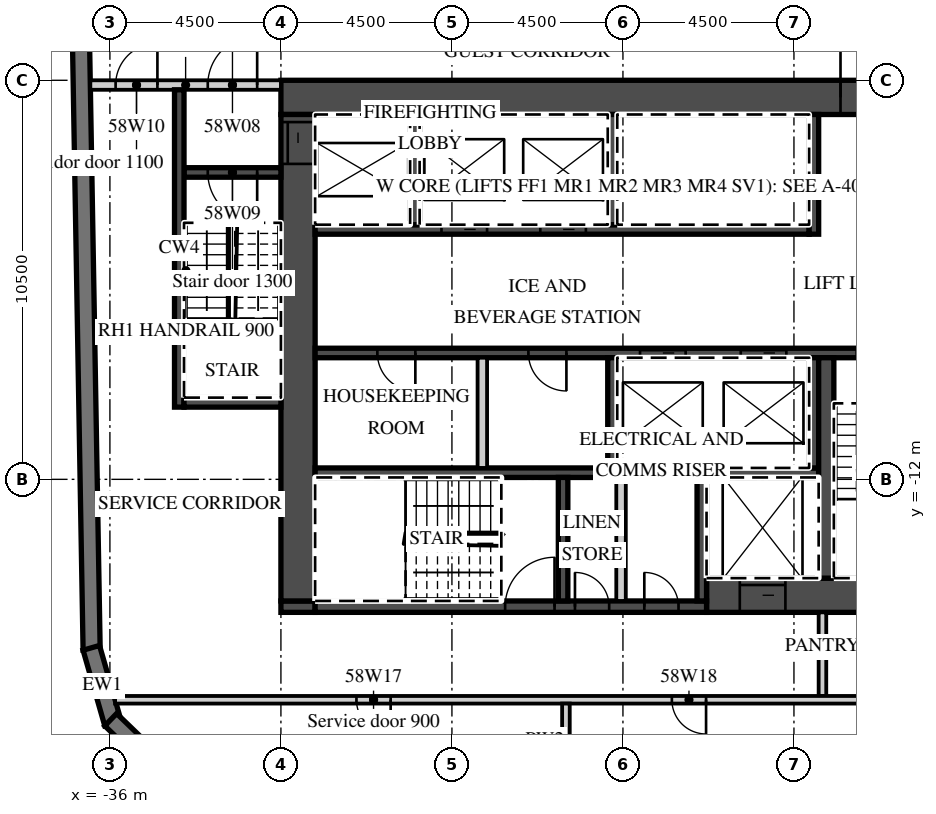
"""IFC4 building model, lengths in metres.
Left out: names, types, materials, properties, quantities, classifications, styles, units other than length and angle.
Written with IfcOpenShell. Run it as: python <this file> out.ifc"""

import sys

from ifc_helpers import new_model, si_unit, direction, frame, frame_2d, origin, place, context, subcontext, project, spatial, polyline, rectangle, outline, extrude, element, fill, save


model = new_model("IFC4")
c1 = context("Model", 3, precision=1e-05, world=origin(), true_north=direction((0.0, 1.0)))
c2 = subcontext(c1, "Body", "Model", "MODEL_VIEW")
j1 = project(units=[si_unit("LENGTHUNIT", "METRE"), si_unit("PLANEANGLEUNIT", "RADIAN")], contexts=[c1])
p1 = place(None, origin())
s1 = spatial("IfcSite", under=j1, at=p1, CompositionType="ELEMENT")
p2 = place(p1, origin())
s2 = spatial("IfcBuilding", under=s1, at=p2, CompositionType="ELEMENT")
p3 = place(p2, frame((0.0, 0.0, 237.5)))
s3 = spatial("IfcBuildingStorey", under=s2, at=p3, CompositionType="ELEMENT", Elevation=237.5)
p4 = place(p3, frame((-37.057, 16.503, 0.0), z_axis=(0.0, 0.0, 1.0), x_axis=(0.017452279857, -0.999847697366, 0.0)))
e1 = element("IfcWall", 1, at=p4, inside=s3, PredefinedType="SOLIDWALL", context=c2, shape_type="SweptSolid", body=[
    extrude(rectangle(XDim=33.0, YDim=0.45, at=frame_2d((16.5, 0.0))), origin(), (0.0, 0.0, 1.0), 3.02),
])
p5 = place(p3, frame((-36.49, -16.434, 0.0), z_axis=(0.0, 0.0, 1.0), x_axis=(0.275577603096, -0.961278827745, 0.0)))
e2 = element("IfcWall", 2, at=p5, inside=s3, PredefinedType="SOLIDWALL", context=c2, shape_type="SweptSolid", body=[
    extrude(outline(polyline([(0.0, -0.225), (2.071, -0.225), (1.95, 0.225), (0.121, 0.225), (0.0, -0.225)])), origin(), (0.0, 0.0, 1.0), 3.02),
])
p6 = place(p3, frame((-35.979, -18.324, 0.0), z_axis=(0.0, 0.0, 1.0), x_axis=(0.719320193998, -0.694678672846, 0.0)))
e3 = element("IfcWall", 3, at=p6, inside=s3, PredefinedType="SOLIDWALL", context=c2, shape_type="SweptSolid", body=[
    extrude(outline(polyline([(0.0, -0.225), (2.071, -0.225), (1.95, 0.225), (0.121, 0.225), (0.0, -0.225)])), origin(), (0.0, 0.0, 1.0), 3.02),
])
p7 = place(p3, frame((-31.5, -1.95, 0.0), z_axis=(0.0, 0.0, 1.0), x_axis=(1.0, 0.0, 0.0)))
e4 = element("IfcWall", 4, at=p7, inside=s3, PredefinedType="SHEAR", context=c2, shape_type="SweptSolid", body=[
    extrude(rectangle(XDim=18.0, YDim=0.9, at=frame_2d((9.0, 0.0))), origin(), (0.0, 0.0, 1.0), 3.02),
])
p8 = place(p7, frame((14.725, 0.0, 0.0)))
e5 = element("IfcOpeningElement", 5, at=p8, cuts=e4, PredefinedType="OPENING", context=c2, shape_type="SweptSolid", body=[
    extrude(rectangle(XDim=1.8, YDim=2.1, at=frame_2d((0.9, 1.05))), frame((0.0, 0.46, 0.0), z_axis=(0.0, -1.0, 0.0), x_axis=(1.0, 0.0, 0.0)), (0.0, 0.0, 1.0), 0.92),
])
p9 = place(p3, frame((-20.3, -15.05, 0.0), z_axis=(0.0, 0.0, 1.0), x_axis=(1.0, 0.0, 0.0)))
e6 = element("IfcWall", 6, at=p9, inside=s3, PredefinedType="SHEAR", context=c2, shape_type="SweptSolid", body=[
    extrude(rectangle(XDim=6.8, YDim=0.9, at=frame_2d((3.4, 0.0))), origin(), (0.0, 0.0, 1.0), 3.02),
])
p10 = place(p9, frame((0.875, 0.0, 0.0)))
e7 = element("IfcOpeningElement", 7, at=p10, cuts=e6, PredefinedType="OPENING", context=c2, shape_type="SweptSolid", body=[
    extrude(rectangle(XDim=1.2, YDim=2.1, at=frame_2d((0.6, 1.05))), frame((0.0, 0.46, 0.0), z_axis=(0.0, -1.0, 0.0), x_axis=(1.0, 0.0, 0.0)), (0.0, 0.0, 1.0), 0.92),
])
p11 = place(p3, frame((-31.5, -15.35, 0.0), z_axis=(0.0, 0.0, 1.0), x_axis=(1.0, 0.0, 0.0)))
e8 = element("IfcWall", 8, at=p11, inside=s3, PredefinedType="SHEAR", context=c2, shape_type="SweptSolid", body=[
    extrude(rectangle(XDim=0.9, YDim=0.3, at=frame_2d((0.45, 0.0))), origin(), (0.0, 0.0, 1.0), 3.02),
])
p12 = place(p3, frame((-30.6, -15.35, 0.0), z_axis=(0.0, 0.0, 1.0), x_axis=(1.0, 0.0, 0.0)))
e9 = element("IfcWall", 9, at=p12, inside=s3, PredefinedType="SHEAR", context=c2, shape_type="SweptSolid", body=[
    extrude(rectangle(XDim=10.3, YDim=0.3, at=frame_2d((5.15, 0.0))), origin(), (0.0, 0.0, 1.0), 3.02),
])
p13 = place(p12, frame((5.0, 0.0, 0.0)))
e10 = element("IfcOpeningElement", 10, at=p13, cuts=e9, PredefinedType="OPENING", context=c2, shape_type="SweptSolid", body=[
    extrude(rectangle(XDim=1.3, YDim=2.1, at=frame_2d((0.65, 1.05))), frame((0.0, 0.16, 0.0), z_axis=(0.0, -1.0, 0.0), x_axis=(1.0, 0.0, 0.0)), (0.0, 0.0, 1.0), 0.32),
])
p14 = place(p12, frame((6.837, 0.0, 0.0)))
e11 = element("IfcOpeningElement", 11, at=p14, cuts=e9, PredefinedType="OPENING", context=c2, shape_type="SweptSolid", body=[
    extrude(rectangle(XDim=0.9, YDim=2.1, at=frame_2d((0.45, 1.05))), frame((0.0, 0.16, 0.0), z_axis=(0.0, -1.0, 0.0), x_axis=(1.0, 0.0, 0.0)), (0.0, 0.0, 1.0), 0.32),
])
p15 = place(p12, frame((8.663, 0.0, 0.0)))
e12 = element("IfcOpeningElement", 12, at=p15, cuts=e9, PredefinedType="OPENING", context=c2, shape_type="SweptSolid", body=[
    extrude(rectangle(XDim=0.9, YDim=2.1, at=frame_2d((0.45, 1.05))), frame((0.0, 0.16, 0.0), z_axis=(0.0, -1.0, 0.0), x_axis=(1.0, 0.0, 0.0)), (0.0, 0.0, 1.0), 0.32),
])
p16 = place(p3, frame((-31.05, -15.2, 0.0), z_axis=(0.0, 0.0, 1.0), x_axis=(0.0, 1.0, 0.0)))
e13 = element("IfcWall", 13, at=p16, inside=s3, PredefinedType="SHEAR", context=c2, shape_type="SweptSolid", body=[
    extrude(rectangle(XDim=12.8, YDim=0.9, at=frame_2d((6.4, 0.0))), origin(), (0.0, 0.0, 1.0), 3.02),
])
p17 = place(p16, frame((11.5, 0.0, 0.0)))
e14 = element("IfcOpeningElement", 14, at=p17, cuts=e13, PredefinedType="OPENING", context=c2, shape_type="SweptSolid", body=[
    extrude(rectangle(XDim=1.1, YDim=2.1, at=frame_2d((0.55, 1.05))), frame((0.0, 0.46, 0.0), z_axis=(0.0, -1.0, 0.0), x_axis=(1.0, 0.0, 0.0)), (0.0, 0.0, 1.0), 0.92),
])
p18 = place(p3, frame((-30.6, -5.425, 0.0), z_axis=(0.0, 0.0, 1.0), x_axis=(1.0, 0.0, 0.0)))
e15 = element("IfcWall", 15, at=p18, inside=s3, PredefinedType="SHEAR", context=c2, shape_type="SweptSolid", body=[
    extrude(rectangle(XDim=13.0, YDim=0.25, at=frame_2d((6.5, 0.0))), origin(), (0.0, 0.0, 1.0), 3.02),
])
p19 = place(p18, frame((3.325, 0.0, 0.0)))
e16 = element("IfcOpeningElement", 16, at=p19, cuts=e15, PredefinedType="OPENING", context=c2, shape_type="SweptSolid", body=[
    extrude(rectangle(XDim=1.2, YDim=2.1, at=frame_2d((0.6, 1.05))), frame((0.0, 0.135, 0.0), z_axis=(0.0, -1.0, 0.0), x_axis=(1.0, 0.0, 0.0)), (0.0, 0.0, 1.0), 0.27),
])
p20 = place(p18, frame((5.925, 0.0, 0.0)))
e17 = element("IfcOpeningElement", 17, at=p20, cuts=e15, PredefinedType="OPENING", context=c2, shape_type="SweptSolid", body=[
    extrude(rectangle(XDim=1.2, YDim=2.1, at=frame_2d((0.6, 1.05))), frame((0.0, 0.135, 0.0), z_axis=(0.0, -1.0, 0.0), x_axis=(1.0, 0.0, 0.0)), (0.0, 0.0, 1.0), 0.27),
])
p21 = place(p3, frame((-17.475, -5.55, 0.0), z_axis=(0.0, 0.0, 1.0), x_axis=(0.0, 1.0, 0.0)))
e18 = element("IfcWall", 18, at=p21, inside=s3, PredefinedType="SHEAR", context=c2, shape_type="SweptSolid", body=[
    extrude(rectangle(XDim=3.15, YDim=0.25, at=frame_2d((1.575, 0.0))), origin(), (0.0, 0.0, 1.0), 3.02),
])
for number, where, z_axis, x_axis in (
    (19, (-27.975, -5.3, 0.0), (0.0, 0.0, 1.0), (0.0, 1.0, 0.0)),
    (20, (-22.775, -5.3, 0.0), (0.0, 0.0, 1.0), (0.0, 1.0, 0.0)),
):
    element("IfcWall", number, at=place(p3, frame(where, z_axis=z_axis, x_axis=x_axis)), inside=s3, PredefinedType="SHEAR", context=c2, shape_type="SweptSolid", body=[
        extrude(rectangle(XDim=2.9, YDim=0.25, at=frame_2d((1.45, 0.0))), origin(), (0.0, 0.0, 1.0), 3.02),
    ])
p22 = place(p3, frame((-30.6, -8.675, 0.0), z_axis=(0.0, 0.0, 1.0), x_axis=(1.0, 0.0, 0.0)))
e21 = element("IfcWall", 21, at=p22, inside=s3, PredefinedType="SHEAR", context=c2, shape_type="SweptSolid", body=[
    extrude(rectangle(XDim=16.2, YDim=0.25, at=frame_2d((8.1, 0.0))), origin(), (0.0, 0.0, 1.0), 3.02),
])
p23 = place(p22, frame((8.55, 0.0, 0.0)))
e22 = element("IfcOpeningElement", 22, at=p23, cuts=e21, PredefinedType="OPENING", context=c2, shape_type="SweptSolid", body=[
    extrude(rectangle(XDim=1.2, YDim=2.1, at=frame_2d((0.6, 1.05))), frame((0.0, 0.135, 0.0), z_axis=(0.0, -1.0, 0.0), x_axis=(1.0, 0.0, 0.0)), (0.0, 0.0, 1.0), 0.27),
])
p24 = place(p22, frame((11.2, 0.0, 0.0)))
e23 = element("IfcOpeningElement", 23, at=p24, cuts=e21, PredefinedType="OPENING", context=c2, shape_type="SweptSolid", body=[
    extrude(rectangle(XDim=1.2, YDim=2.1, at=frame_2d((0.6, 1.05))), frame((0.0, 0.135, 0.0), z_axis=(0.0, -1.0, 0.0), x_axis=(1.0, 0.0, 0.0)), (0.0, 0.0, 1.0), 0.27),
])
p25 = place(p22, frame((14.25, 0.0, 0.0)))
e24 = element("IfcOpeningElement", 24, at=p25, cuts=e21, PredefinedType="OPENING", context=c2, shape_type="SweptSolid", body=[
    extrude(rectangle(XDim=1.3, YDim=2.1, at=frame_2d((0.65, 1.05))), frame((0.0, 0.135, 0.0), z_axis=(0.0, -1.0, 0.0), x_axis=(1.0, 0.0, 0.0)), (0.0, 0.0, 1.0), 0.27),
])
p26 = place(p22, frame((1.637, 0.0, 0.0)))
e25 = element("IfcOpeningElement", 25, at=p26, cuts=e21, PredefinedType="OPENING", context=c2, shape_type="SweptSolid", body=[
    extrude(rectangle(XDim=1.0, YDim=2.1, at=frame_2d((0.5, 1.05))), frame((0.0, 0.135, 0.0), z_axis=(0.0, -1.0, 0.0), x_axis=(1.0, 0.0, 0.0)), (0.0, 0.0, 1.0), 0.27),
])
p27 = place(p22, frame((5.613, 0.0, 0.0)))
e26 = element("IfcOpeningElement", 26, at=p27, cuts=e21, PredefinedType="OPENING", context=c2, shape_type="SweptSolid", body=[
    extrude(rectangle(XDim=1.0, YDim=2.1, at=frame_2d((0.5, 1.05))), frame((0.0, 0.135, 0.0), z_axis=(0.0, -1.0, 0.0), x_axis=(1.0, 0.0, 0.0)), (0.0, 0.0, 1.0), 0.27),
])
p28 = place(p3, frame((-30.6, -11.825, 0.0), z_axis=(0.0, 0.0, 1.0), x_axis=(1.0, 0.0, 0.0)))
e27 = element("IfcWall", 27, at=p28, inside=s3, PredefinedType="SHEAR", context=c2, shape_type="SweptSolid", body=[
    extrude(rectangle(XDim=13.25, YDim=0.25, at=frame_2d((6.625, 0.0))), origin(), (0.0, 0.0, 1.0), 3.02),
])
for number, where, z_axis, x_axis in (
    (28, (-17.475, -11.7, 0.0), (0.0, 0.0, 1.0), (0.0, 1.0, 0.0)),
    (29, (-22.775, -11.7, 0.0), (0.0, 0.0, 1.0), (0.0, 1.0, 0.0)),
):
    element("IfcWall", number, at=place(p3, frame(where, z_axis=z_axis, x_axis=x_axis)), inside=s3, PredefinedType="SHEAR", context=c2, shape_type="SweptSolid", body=[
        extrude(rectangle(XDim=2.9, YDim=0.25, at=frame_2d((1.45, 0.0))), origin(), (0.0, 0.0, 1.0), 3.02),
    ])
p29 = place(p3, frame((-26.2, -11.7, 0.0), z_axis=(0.0, 0.0, 1.0), x_axis=(0.0, 1.0, 0.0)))
e30 = element("IfcWall", 30, at=p29, inside=s3, PredefinedType="PARTITIONING", context=c2, shape_type="SweptSolid", body=[
    extrude(rectangle(XDim=2.9, YDim=0.25, at=frame_2d((1.45, 0.0))), origin(), (0.0, 0.0, 1.0), 3.02),
])
p30 = place(p3, frame((-17.15, -14.6, 0.0), z_axis=(0.0, 0.0, 1.0), x_axis=(0.0, 1.0, 0.0)))
e31 = element("IfcWall", 31, at=p30, inside=s3, PredefinedType="SHEAR", context=c2, shape_type="SweptSolid", body=[
    extrude(rectangle(XDim=5.8, YDim=0.4, at=frame_2d((2.9, 0.0))), origin(), (0.0, 0.0, 1.0), 3.02),
])
for number, where, z_axis, x_axis in (
    (32, (-20.425, -15.2, 0.0), (0.0, 0.0, 1.0), (0.0, 1.0, 0.0)),
    (33, (-24.075, -15.2, 0.0), (0.0, 0.0, 1.0), (0.0, 1.0, 0.0)),
):
    element("IfcWall", number, at=place(p3, frame(where, z_axis=z_axis, x_axis=x_axis)), inside=s3, PredefinedType="SHEAR", context=c2, shape_type="SweptSolid", body=[
        extrude(rectangle(XDim=3.25, YDim=0.25, at=frame_2d((1.625, 0.0))), origin(), (0.0, 0.0, 1.0), 3.02),
    ])
p31 = place(p3, frame((-22.55, -15.2, 0.0), z_axis=(0.0, 0.0, 1.0), x_axis=(0.0, 1.0, 0.0)))
e34 = element("IfcWall", 34, at=p31, inside=s3, PredefinedType="PARTITIONING", context=c2, shape_type="SweptSolid", body=[
    extrude(rectangle(XDim=3.25, YDim=0.25, at=frame_2d((1.625, 0.0))), origin(), (0.0, 0.0, 1.0), 3.02),
])
p32 = place(p3, frame((-36.515, -1.625, 0.0), z_axis=(0.0, 0.0, 1.0), x_axis=(1.0, 0.0, 0.0)))
e35 = element("IfcWall", 35, at=p32, inside=s3, PredefinedType="PARTITIONING", context=c2, shape_type="SweptSolid", body=[
    extrude(rectangle(XDim=5.015, YDim=0.25, at=frame_2d((2.508, 0.0))), origin(), (0.0, 0.0, 1.0), 3.02),
])
p33 = place(p32, frame((3.09, 0.0, 0.0)))
e36 = element("IfcOpeningElement", 36, at=p33, cuts=e35, PredefinedType="OPENING", context=c2, shape_type="SweptSolid", body=[
    extrude(rectangle(XDim=1.3, YDim=2.1, at=frame_2d((0.65, 1.05))), frame((0.0, 0.135, 0.0), z_axis=(0.0, -1.0, 0.0), x_axis=(1.0, 0.0, 0.0)), (0.0, 0.0, 1.0), 0.27),
])
p34 = place(p32, frame((0.665, 0.0, 0.0)))
e37 = element("IfcOpeningElement", 37, at=p34, cuts=e35, PredefinedType="OPENING", context=c2, shape_type="SweptSolid", body=[
    extrude(rectangle(XDim=1.1, YDim=2.1, at=frame_2d((0.55, 1.05))), frame((0.0, 0.135, 0.0), z_axis=(0.0, -1.0, 0.0), x_axis=(1.0, 0.0, 0.0)), (0.0, 0.0, 1.0), 0.27),
])
p35 = place(p3, frame((-34.05, -3.925, 0.0), z_axis=(0.0, 0.0, 1.0), x_axis=(1.0, 0.0, 0.0)))
e38 = element("IfcWall", 38, at=p35, inside=s3, PredefinedType="SHEAR", context=c2, shape_type="SweptSolid", body=[
    extrude(rectangle(XDim=2.55, YDim=0.25, at=frame_2d((1.275, 0.0))), origin(), (0.0, 0.0, 1.0), 3.02),
])
p36 = place(p35, frame((0.625, 0.0, 0.0)))
e39 = element("IfcOpeningElement", 39, at=p36, cuts=e38, PredefinedType="OPENING", context=c2, shape_type="SweptSolid", body=[
    extrude(rectangle(XDim=1.3, YDim=2.1, at=frame_2d((0.65, 1.05))), frame((0.0, 0.135, 0.0), z_axis=(0.0, -1.0, 0.0), x_axis=(1.0, 0.0, 0.0)), (0.0, 0.0, 1.0), 0.27),
])
p37 = place(p3, frame((-34.175, -10.1, 0.0), z_axis=(0.0, 0.0, 1.0), x_axis=(0.0, 1.0, 0.0)))
e40 = element("IfcWall", 40, at=p37, inside=s3, PredefinedType="SHEAR", context=c2, shape_type="SweptSolid", body=[
    extrude(rectangle(XDim=8.35, YDim=0.25, at=frame_2d((4.175, 0.0))), origin(), (0.0, 0.0, 1.0), 3.02),
])
p38 = place(p3, frame((-34.05, -9.975, 0.0), z_axis=(0.0, 0.0, 1.0), x_axis=(1.0, 0.0, 0.0)))
e41 = element("IfcWall", 41, at=p38, inside=s3, PredefinedType="SHEAR", context=c2, shape_type="SweptSolid", body=[
    extrude(rectangle(XDim=2.55, YDim=0.25, at=frame_2d((1.275, 0.0))), origin(), (0.0, 0.0, 1.0), 3.02),
])
p39 = place(p3, frame((-17.25, -17.7, 0.0), z_axis=(0.0, 0.0, 1.0), x_axis=(0.0, 1.0, 0.0)))
e42 = element("IfcWall", 42, at=p39, inside=s3, PredefinedType="PARTITIONING", context=c2, shape_type="SweptSolid", body=[
    extrude(rectangle(XDim=2.2, YDim=0.2, at=frame_2d((1.1, 0.0))), origin(), (0.0, 0.0, 1.0), 3.02),
])
p40 = place(p3, frame((-35.864, -17.8, 0.0), z_axis=(0.0, 0.0, 1.0), x_axis=(1.0, 0.0, 0.0)))
e43 = element("IfcWall", 43, at=p40, inside=s3, PredefinedType="PARTITIONING", context=c2, shape_type="SweptSolid", body=[
    extrude(rectangle(XDim=22.264, YDim=0.2, at=frame_2d((11.132, 0.0))), origin(), (0.0, 0.0, 1.0), 3.02),
])
p41 = place(p40, frame((6.351, 0.0, 0.0)))
e44 = element("IfcOpeningElement", 44, at=p41, cuts=e43, PredefinedType="OPENING", context=c2, shape_type="SweptSolid", body=[
    extrude(rectangle(XDim=0.9, YDim=2.1, at=frame_2d((0.45, 1.05))), frame((0.0, 0.11, 0.0), z_axis=(0.0, -1.0, 0.0), x_axis=(1.0, 0.0, 0.0)), (0.0, 0.0, 1.0), 0.22),
])
p42 = place(p40, frame((14.651, 0.0, 0.0)))
e45 = element("IfcOpeningElement", 45, at=p42, cuts=e43, PredefinedType="OPENING", context=c2, shape_type="SweptSolid", body=[
    extrude(rectangle(XDim=0.9, YDim=2.1, at=frame_2d((0.45, 1.05))), frame((0.0, 0.11, 0.0), z_axis=(0.0, -1.0, 0.0), x_axis=(1.0, 0.0, 0.0)), (0.0, 0.0, 1.0), 0.22),
])
p43 = place(p3, frame((-24.0, -19.824, 0.0), z_axis=(0.0, 0.0, 1.0), x_axis=(0.0, 1.0, 0.0)))
e46 = element("IfcWall", 46, at=p43, inside=s3, PredefinedType="PARTITIONING", context=c2, shape_type="SweptSolid", body=[
    extrude(rectangle(XDim=1.925, YDim=0.2, at=frame_2d((0.962, 0.0))), origin(), (0.0, 0.0, 1.0), 3.02),
])
p44 = place(p23, origin())
e47 = element("IfcDoor", 47, at=p44, inside=s3, OperationType="SLIDING_TO_LEFT", PredefinedType="DOOR", context=c2, shape_type="SweptSolid", body=[
    extrude(rectangle(XDim=1.2, YDim=2.1, at=frame_2d((0.6, 1.05))), frame((0.0, 0.025, 0.0), z_axis=(0.0, -1.0, 0.0), x_axis=(1.0, 0.0, 0.0)), (0.0, 0.0, 1.0), 0.05),
])
fill(e22, e47)
p45 = place(p24, origin())
e48 = element("IfcDoor", 48, at=p45, inside=s3, OperationType="SLIDING_TO_RIGHT", PredefinedType="DOOR", context=c2, shape_type="SweptSolid", body=[
    extrude(rectangle(XDim=1.2, YDim=2.1, at=frame_2d((0.6, 1.05))), frame((0.0, 0.025, 0.0), z_axis=(0.0, -1.0, 0.0), x_axis=(1.0, 0.0, 0.0)), (0.0, 0.0, 1.0), 0.05),
])
fill(e23, e48)
p46 = place(p19, origin())
e49 = element("IfcDoor", 49, at=p46, inside=s3, OperationType="SLIDING_TO_RIGHT", PredefinedType="DOOR", context=c2, shape_type="SweptSolid", body=[
    extrude(rectangle(XDim=1.2, YDim=2.1, at=frame_2d((0.6, 1.05))), frame((0.0, 0.025, 0.0), z_axis=(0.0, -1.0, 0.0), x_axis=(1.0, 0.0, 0.0)), (0.0, 0.0, 1.0), 0.05),
])
fill(e16, e49)
p47 = place(p20, origin())
e50 = element("IfcDoor", 50, at=p47, inside=s3, OperationType="SLIDING_TO_RIGHT", PredefinedType="DOOR", context=c2, shape_type="SweptSolid", body=[
    extrude(rectangle(XDim=1.2, YDim=2.1, at=frame_2d((0.6, 1.05))), frame((0.0, 0.025, 0.0), z_axis=(0.0, -1.0, 0.0), x_axis=(1.0, 0.0, 0.0)), (0.0, 0.0, 1.0), 0.05),
])
fill(e17, e50)
p48 = place(p10, origin())
e51 = element("IfcDoor", 51, at=p48, inside=s3, OperationType="SLIDING_TO_LEFT", PredefinedType="DOOR", context=c2, shape_type="SweptSolid", body=[
    extrude(rectangle(XDim=1.2, YDim=2.1, at=frame_2d((0.6, 1.05))), frame((0.0, 0.025, 0.0), z_axis=(0.0, -1.0, 0.0), x_axis=(1.0, 0.0, 0.0)), (0.0, 0.0, 1.0), 0.05),
])
fill(e7, e51)
p49 = place(p17, origin())
e52 = element("IfcDoor", 52, at=p49, inside=s3, OperationType="SLIDING_TO_RIGHT", PredefinedType="DOOR", context=c2, shape_type="SweptSolid", body=[
    extrude(rectangle(XDim=1.1, YDim=2.1, at=frame_2d((0.55, 1.05))), frame((0.0, 0.025, 0.0), z_axis=(0.0, -1.0, 0.0), x_axis=(1.0, 0.0, 0.0)), (0.0, 0.0, 1.0), 0.05),
])
fill(e14, e52)
p50 = place(p8, origin())
e53 = element("IfcDoor", 53, at=p50, inside=s3, OperationType="DOUBLE_DOOR_DOUBLE_SWING", PredefinedType="DOOR", context=c2, shape_type="SweptSolid", body=[
    extrude(rectangle(XDim=1.8, YDim=2.1, at=frame_2d((0.9, 1.05))), frame((0.0, 0.025, 0.0), z_axis=(0.0, -1.0, 0.0), x_axis=(1.0, 0.0, 0.0)), (0.0, 0.0, 1.0), 0.05),
])
fill(e5, e53)
p51 = place(p33, origin())
e54 = element("IfcDoor", 54, at=p51, inside=s3, OperationType="SINGLE_SWING_RIGHT", PredefinedType="DOOR", context=c2, shape_type="SweptSolid", body=[
    extrude(rectangle(XDim=1.3, YDim=2.1, at=frame_2d((0.65, 1.05))), frame((0.0, 0.025, 0.0), z_axis=(0.0, -1.0, 0.0), x_axis=(1.0, 0.0, 0.0)), (0.0, 0.0, 1.0), 0.05),
])
fill(e36, e54)
p52 = place(p36, origin())
e55 = element("IfcDoor", 55, at=p52, inside=s3, OperationType="SINGLE_SWING_RIGHT", PredefinedType="DOOR", context=c2, shape_type="SweptSolid", body=[
    extrude(rectangle(XDim=1.3, YDim=2.1, at=frame_2d((0.65, 1.05))), frame((0.0, 0.025, 0.0), z_axis=(0.0, -1.0, 0.0), x_axis=(1.0, 0.0, 0.0)), (0.0, 0.0, 1.0), 0.05),
])
fill(e39, e55)
p53 = place(p34, origin())
e56 = element("IfcDoor", 56, at=p53, inside=s3, OperationType="SINGLE_SWING_RIGHT", PredefinedType="DOOR", context=c2, shape_type="SweptSolid", body=[
    extrude(rectangle(XDim=1.1, YDim=2.1, at=frame_2d((0.55, 1.05))), frame((0.0, 0.025, 0.0), z_axis=(0.0, -1.0, 0.0), x_axis=(1.0, 0.0, 0.0)), (0.0, 0.0, 1.0), 0.05),
])
fill(e37, e56)
p54 = place(p25, origin())
e57 = element("IfcDoor", 57, at=p54, inside=s3, OperationType="SINGLE_SWING_RIGHT", PredefinedType="DOOR", context=c2, shape_type="SweptSolid", body=[
    extrude(rectangle(XDim=1.3, YDim=2.1, at=frame_2d((0.65, 1.05))), frame((0.0, 0.025, 0.0), z_axis=(0.0, -1.0, 0.0), x_axis=(1.0, 0.0, 0.0)), (0.0, 0.0, 1.0), 0.05),
])
fill(e24, e57)
p55 = place(p13, origin())
e58 = element("IfcDoor", 58, at=p55, inside=s3, OperationType="SINGLE_SWING_RIGHT", PredefinedType="DOOR", context=c2, shape_type="SweptSolid", body=[
    extrude(rectangle(XDim=1.3, YDim=2.1, at=frame_2d((0.65, 1.05))), frame((0.0, 0.025, 0.0), z_axis=(0.0, -1.0, 0.0), x_axis=(1.0, 0.0, 0.0)), (0.0, 0.0, 1.0), 0.05),
])
fill(e10, e58)
p56 = place(p14, origin())
e59 = element("IfcDoor", 59, at=p56, inside=s3, OperationType="SINGLE_SWING_LEFT", PredefinedType="DOOR", context=c2, shape_type="SweptSolid", body=[
    extrude(rectangle(XDim=0.9, YDim=2.1, at=frame_2d((0.45, 1.05))), frame((0.0, 0.025, 0.0), z_axis=(0.0, -1.0, 0.0), x_axis=(1.0, 0.0, 0.0)), (0.0, 0.0, 1.0), 0.05),
])
fill(e11, e59)
p57 = place(p15, origin())
e60 = element("IfcDoor", 60, at=p57, inside=s3, OperationType="SINGLE_SWING_LEFT", PredefinedType="DOOR", context=c2, shape_type="SweptSolid", body=[
    extrude(rectangle(XDim=0.9, YDim=2.1, at=frame_2d((0.45, 1.05))), frame((0.0, 0.025, 0.0), z_axis=(0.0, -1.0, 0.0), x_axis=(1.0, 0.0, 0.0)), (0.0, 0.0, 1.0), 0.05),
])
fill(e12, e60)
p58 = place(p26, origin())
e61 = element("IfcDoor", 61, at=p58, inside=s3, OperationType="SINGLE_SWING_RIGHT", PredefinedType="DOOR", context=c2, shape_type="SweptSolid", body=[
    extrude(rectangle(XDim=1.0, YDim=2.1, at=frame_2d((0.5, 1.05))), frame((0.0, 0.025, 0.0), z_axis=(0.0, -1.0, 0.0), x_axis=(1.0, 0.0, 0.0)), (0.0, 0.0, 1.0), 0.05),
])
fill(e25, e61)
p59 = place(p27, origin())
e62 = element("IfcDoor", 62, at=p59, inside=s3, OperationType="SINGLE_SWING_RIGHT", PredefinedType="DOOR", context=c2, shape_type="SweptSolid", body=[
    extrude(rectangle(XDim=1.0, YDim=2.1, at=frame_2d((0.5, 1.05))), frame((0.0, 0.025, 0.0), z_axis=(0.0, -1.0, 0.0), x_axis=(1.0, 0.0, 0.0)), (0.0, 0.0, 1.0), 0.05),
])
fill(e26, e62)
p60 = place(p41, origin())
e63 = element("IfcDoor", 63, at=p60, inside=s3, OperationType="SINGLE_SWING_RIGHT", PredefinedType="DOOR", context=c2, shape_type="SweptSolid", body=[
    extrude(rectangle(XDim=0.9, YDim=2.1, at=frame_2d((0.45, 1.05))), frame((0.0, 0.025, 0.0), z_axis=(0.0, -1.0, 0.0), x_axis=(1.0, 0.0, 0.0)), (0.0, 0.0, 1.0), 0.05),
])
fill(e44, e63)
p61 = place(p42, origin())
e64 = element("IfcDoor", 64, at=p61, inside=s3, OperationType="SINGLE_SWING_RIGHT", PredefinedType="DOOR", context=c2, shape_type="SweptSolid", body=[
    extrude(rectangle(XDim=0.9, YDim=2.1, at=frame_2d((0.45, 1.05))), frame((0.0, 0.025, 0.0), z_axis=(0.0, -1.0, 0.0), x_axis=(1.0, 0.0, 0.0)), (0.0, 0.0, 1.0), 0.05),
])
fill(e45, e64)
save(model, sys.argv[1])
